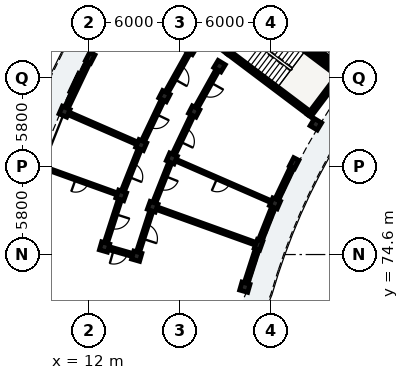
"""IFC4 building model, lengths in metres.
Left out: names, types, materials, properties, quantities, classifications, styles, units other than length and angle.
Written with IfcOpenShell. Run it as: python <this file> out.ifc"""

import sys

from ifc_helpers import new_model, si_unit, direction, frame, frame_2d, origin, origin_2d, place, context, subcontext, project, spatial, rectangle, extrude, element, fill, save


model = new_model("IFC4")
c1 = context("Model", 3, precision=1e-05, world=origin(), true_north=direction((0.0, 1.0)))
c2 = subcontext(c1, "Body", "Model", "MODEL_VIEW")
j1 = project(units=[si_unit("LENGTHUNIT", "METRE"), si_unit("PLANEANGLEUNIT", "RADIAN")], contexts=[c1])
p1 = place(None, origin())
s1 = spatial("IfcSite", under=j1, at=p1, CompositionType="ELEMENT")
p2 = place(p1, origin())
s2 = spatial("IfcBuilding", under=s1, at=p2, CompositionType="ELEMENT")
p3 = place(p2, frame((0.0, 0.0, 12.2)))
s3 = spatial("IfcBuildingStorey", under=s2, at=p3, CompositionType="ELEMENT", Elevation=12.2)
p4 = place(p3, frame((21.199, 87.897, 0.0), z_axis=(0.0, 0.0, 1.0), x_axis=(0.798639633744, -0.601809550782, 0.0)))
e1 = element("IfcWall", 1, at=p4, inside=s3, PredefinedType="SHEAR", context=c2, shape_type="SweptSolid", body=[
    extrude(rectangle(XDim=6.6, YDim=0.28, at=frame_2d((3.3, 0.0))), origin(), (0.0, 0.0, 1.0), 3.11),
])
for number, where, z_axis, x_axis in (
    (2, (26.497, 83.729, 0.0), (0.0, 0.0, 1.0), (0.602, 0.799, 0.0)),
    (3, (21.003, 87.87, 0.0), (0.0, 0.0, 1.0), (0.602, 0.799, 0.0)),
):
    element("IfcWall", number, at=place(p3, frame(where, z_axis=z_axis, x_axis=x_axis)), inside=s3, PredefinedType="SHEAR", context=c2, shape_type="SweptSolid", body=[
        extrude(rectangle(XDim=3.48, YDim=0.28, at=frame_2d((1.74, 0.0))), origin(), (0.0, 0.0, 1.0), 3.11),
    ])
p5 = place(p3, frame((23.125, 90.453, 0.0), z_axis=(0.0, 0.0, 1.0), x_axis=(0.798639633744, -0.601809550782, 0.0)))
e4 = element("IfcWall", 4, at=p5, inside=s3, PredefinedType="SHEAR", context=c2, shape_type="SweptSolid", body=[
    extrude(rectangle(XDim=6.6, YDim=0.28, at=frame_2d((3.3, 0.0))), origin(), (0.0, 0.0, 1.0), 3.11),
])
p6 = place(p5, frame((0.22, 0.0, 0.0)))
e5 = element("IfcOpeningElement", 5, at=p6, cuts=e4, PredefinedType="OPENING", context=c2, shape_type="SweptSolid", body=[
    extrude(rectangle(XDim=1.05, YDim=2.15, at=frame_2d((0.525, 1.075))), frame((0.0, 0.15, 0.0), z_axis=(0.0, -1.0, 0.0), x_axis=(1.0, 0.0, 0.0)), (0.0, 0.0, 1.0), 0.3),
])
p7 = place(p3, frame((26.455, 88.476, 0.0), z_axis=(0.0, 0.0, 1.0), x_axis=(0.798608971494, -0.601850239387, 0.0)))
e6 = element("IfcWall", 6, at=p7, inside=s3, PredefinedType="SHEAR", context=c2, shape_type="SweptSolid", body=[
    extrude(rectangle(XDim=2.7, YDim=0.23, at=frame_2d((1.35, 0.0))), origin(), (0.0, 0.0, 1.0), 3.11),
])
for number, where, z_axis, x_axis in (
    (7, (26.943, 83.167, 0.0), (0.0, 0.0, 1.0), (-0.856, 0.517, 0.0)),
    (8, (20.608, 86.991, 0.0), (0.0, 0.0, 1.0), (-0.856, 0.517, 0.0)),
    (9, (18.724, 88.128, 0.0), (0.0, 0.0, 1.0), (-0.856, 0.517, 0.0)),
):
    element("IfcColumn", number, at=place(p3, frame(where, z_axis=z_axis, x_axis=x_axis)), inside=s3, PredefinedType="COLUMN", context=c2, shape_type="SweptSolid", body=[
        extrude(rectangle(XDim=0.55, YDim=0.55, at=origin_2d()), origin(), (0.0, 0.0, 1.0), 3.105),
    ])
p8 = place(p3, frame((25.513, 80.61, 0.0), z_axis=(0.0, 0.0, 1.0), x_axis=(-0.888350277506, 0.459166401705, 0.0)))
e10 = element("IfcColumn", 10, at=p8, inside=s3, PredefinedType="PILASTER", context=c2, shape_type="SweptSolid", body=[
    extrude(rectangle(XDim=0.38, YDim=0.62, at=origin_2d()), origin(), (0.0, 0.0, 1.0), 3.105),
])
for number, where, z_axis, x_axis in (
    (11, (18.939, 84.008, 0.0), (0.0, 0.0, 1.0), (-0.888, 0.459, 0.0)),
    (12, (16.985, 85.018, 0.0), (0.0, 0.0, 1.0), (-0.888, 0.459, 0.0)),
):
    element("IfcColumn", number, at=place(p3, frame(where, z_axis=z_axis, x_axis=x_axis)), inside=s3, PredefinedType="COLUMN", context=c2, shape_type="SweptSolid", body=[
        extrude(rectangle(XDim=0.55, YDim=0.55, at=origin_2d()), origin(), (0.0, 0.0, 1.0), 3.105),
    ])
p9 = place(p3, frame((12.099, 87.543, 0.0), z_axis=(0.0, 0.0, 1.0), x_axis=(-0.888350277506, 0.459166401705, 0.0)))
e13 = element("IfcColumn", 13, at=p9, inside=s3, PredefinedType="PILASTER", context=c2, shape_type="SweptSolid", body=[
    extrude(rectangle(XDim=0.38, YDim=0.62, at=origin_2d()), origin(), (0.0, 0.0, 1.0), 3.105),
])
for number, where, z_axis, x_axis in (
    (14, (24.254, 77.964, 0.0), (0.0, 0.0, 1.0), (-0.917, 0.4, 0.0)),
    (15, (17.47, 80.921, 0.0), (0.0, 0.0, 1.0), (-0.917, 0.4, 0.0)),
    (16, (15.454, 81.801, 0.0), (0.0, 0.0, 1.0), (-0.917, 0.4, 0.0)),
    (17, (10.412, 83.999, 0.0), (0.0, 0.0, 1.0), (-0.917, 0.4, 0.0)),
):
    element("IfcColumn", number, at=place(p3, frame(where, z_axis=z_axis, x_axis=x_axis)), inside=s3, PredefinedType="COLUMN", context=c2, shape_type="SweptSolid", body=[
        extrude(rectangle(XDim=0.55, YDim=0.55, at=origin_2d()), origin(), (0.0, 0.0, 1.0), 3.105),
    ])
p10 = place(p3, frame((23.172, 75.241, 0.0), z_axis=(0.0, 0.0, 1.0), x_axis=(-0.941012100316, 0.338372911236, 0.0)))
e18 = element("IfcColumn", 18, at=p10, inside=s3, PredefinedType="PILASTER", context=c2, shape_type="SweptSolid", body=[
    extrude(rectangle(XDim=0.38, YDim=0.62, at=origin_2d()), origin(), (0.0, 0.0, 1.0), 3.105),
])
for number, where, z_axis, x_axis in (
    (19, (16.208, 77.745, 0.0), (0.0, 0.0, 1.0), (-0.941, 0.338, 0.0)),
    (20, (14.138, 78.489, 0.0), (0.0, 0.0, 1.0), (-0.941, 0.338, 0.0)),
    (21, (22.272, 72.452, 0.0), (0.0, 0.0, 1.0), (-0.961, 0.276, 0.0)),
    (22, (15.159, 74.492, 0.0), (0.0, 0.0, 1.0), (-0.961, 0.276, 0.0)),
    (23, (13.044, 75.098, 0.0), (0.0, 0.0, 1.0), (-0.961, 0.276, 0.0)),
):
    element("IfcColumn", number, at=place(p3, frame(where, z_axis=z_axis, x_axis=x_axis)), inside=s3, PredefinedType="COLUMN", context=c2, shape_type="SweptSolid", body=[
        extrude(rectangle(XDim=0.55, YDim=0.55, at=origin_2d()), origin(), (0.0, 0.0, 1.0), 3.105),
    ])
p11 = place(p3, frame((12.03, 87.399, 0.0), z_axis=(0.0, 0.0, 1.0), x_axis=(-0.429653621352, -0.902993779413, 0.0)))
e24 = element("IfcWall", 24, at=p11, inside=s3, PredefinedType="SOLIDWALL", context=c2, shape_type="SweptSolid", body=[
    extrude(rectangle(XDim=3.521, YDim=0.245, at=frame_2d((1.76, 0.0))), origin(), (0.0, 0.0, 1.0), 2.355),
])
p12 = place(p11, frame((0.885, 0.0, 0.35)))
e25 = element("IfcOpeningElement", 25, at=p12, cuts=e24, PredefinedType="OPENING", context=c2, shape_type="SweptSolid", body=[
    extrude(rectangle(XDim=1.75, YDim=1.85, at=frame_2d((0.875, 0.925))), frame((0.0, 0.133, 0.0), z_axis=(0.0, -1.0, 0.0), x_axis=(1.0, 0.0, 0.0)), (0.0, 0.0, 1.0), 0.265),
])
p13 = place(p3, frame((25.444, 80.466, 0.0), z_axis=(0.0, 0.0, 1.0), x_axis=(-0.429610836066, -0.903014135844, 0.0)))
e26 = element("IfcWall", 26, at=p13, inside=s3, PredefinedType="SOLIDWALL", context=c2, shape_type="SweptSolid", body=[
    extrude(rectangle(XDim=2.525, YDim=0.245, at=frame_2d((1.263, 0.0))), origin(), (0.0, 0.0, 1.0), 2.355),
])
p14 = place(p13, frame((0.473, 0.0, 0.35)))
e27 = element("IfcOpeningElement", 27, at=p14, cuts=e26, PredefinedType="OPENING", context=c2, shape_type="SweptSolid", body=[
    extrude(rectangle(XDim=1.58, YDim=1.68, at=frame_2d((0.79, 0.84))), frame((0.0, 0.133, 0.0), z_axis=(0.0, -1.0, 0.0), x_axis=(1.0, 0.0, 0.0)), (0.0, 0.0, 1.0), 0.265),
])
p15 = place(p3, frame((24.163, 77.736, 0.0), z_axis=(0.0, 0.0, 1.0), x_axis=(-0.369122600107, -0.92938071106, 0.0)))
e28 = element("IfcWall", 28, at=p15, inside=s3, PredefinedType="SOLIDWALL", context=c2, shape_type="SweptSolid", body=[
    extrude(rectangle(XDim=2.525, YDim=0.245, at=frame_2d((1.263, 0.0))), origin(), (0.0, 0.0, 1.0), 2.355),
])
p16 = place(p15, frame((0.643, 0.0, 0.55)))
e29 = element("IfcOpeningElement", 29, at=p16, cuts=e28, PredefinedType="OPENING", context=c2, shape_type="SweptSolid", body=[
    extrude(rectangle(XDim=1.24, YDim=1.535, at=frame_2d((0.62, 0.768))), frame((0.0, 0.133, 0.0), z_axis=(0.0, -1.0, 0.0), x_axis=(1.0, 0.0, 0.0)), (0.0, 0.0, 1.0), 0.265),
])
p17 = place(p3, frame((23.123, 75.088, 0.0), z_axis=(0.0, 0.0, 1.0), x_axis=(-0.30716379336, -0.951656662903, 0.0)))
e30 = element("IfcWall", 30, at=p17, inside=s3, PredefinedType="SOLIDWALL", context=c2, shape_type="SweptSolid", body=[
    extrude(rectangle(XDim=2.525, YDim=0.245, at=frame_2d((1.263, 0.0))), origin(), (0.0, 0.0, 1.0), 2.355),
])
p18 = place(p17, frame((0.583, 0.0, 0.55)))
e31 = element("IfcOpeningElement", 31, at=p18, cuts=e30, PredefinedType="OPENING", context=c2, shape_type="SweptSolid", body=[
    extrude(rectangle(XDim=1.36, YDim=1.61, at=frame_2d((0.68, 0.805))), frame((0.0, 0.133, 0.0), z_axis=(0.0, -1.0, 0.0), x_axis=(1.0, 0.0, 0.0)), (0.0, 0.0, 1.0), 0.265),
])
p19 = place(p3, frame((9.583, 69.289, 0.0), z_axis=(0.0, 0.0, 1.0), x_axis=(-0.484841794757, 0.874601871743, 0.0)))
e32 = element("IfcWall", 32, at=p19, inside=s3, PredefinedType="SOLIDWALL", context=c2, shape_type="SweptSolid", body=[
    extrude(rectangle(XDim=3.908, YDim=0.245, at=frame_2d((1.954, 0.0))), origin(), (0.0, 0.0, 1.0), 2.355),
])
p20 = place(p19, frame((0.979, 0.0, 0.4)))
e33 = element("IfcOpeningElement", 33, at=p20, cuts=e32, PredefinedType="OPENING", context=c2, shape_type="SweptSolid", body=[
    extrude(rectangle(XDim=1.95, YDim=1.78, at=frame_2d((0.975, 0.89))), frame((0.0, 0.133, 0.0), z_axis=(0.0, -1.0, 0.0), x_axis=(1.0, 0.0, 0.0)), (0.0, 0.0, 1.0), 0.265),
])
p21 = place(p3, frame((18.553, 87.822, 0.0), z_axis=(0.0, 0.0, 1.0), x_axis=(-0.488211211273, -0.872725508501, 0.0)))
e34 = element("IfcWall", 34, at=p21, inside=s3, PredefinedType="PARTITIONING", context=c2, shape_type="SweptSolid", body=[
    extrude(rectangle(XDim=2.863, YDim=0.205, at=frame_2d((1.431, 0.0))), origin(), (0.0, 0.0, 1.0), 2.37),
])
p22 = place(p21, frame((0.947, 0.0, 0.0)))
e35 = element("IfcOpeningElement", 35, at=p22, cuts=e34, PredefinedType="OPENING", context=c2, shape_type="SweptSolid", body=[
    extrude(rectangle(XDim=0.97, YDim=2.15, at=frame_2d((0.485, 1.075))), frame((0.0, 0.113, 0.0), z_axis=(0.0, -1.0, 0.0), x_axis=(1.0, 0.0, 0.0)), (0.0, 0.0, 1.0), 0.225),
])
p23 = place(p3, frame((20.437, 86.685, 0.0), z_axis=(0.0, 0.0, 1.0), x_axis=(-0.48819576874, -0.872734147025, 0.0)))
e36 = element("IfcWall", 36, at=p23, inside=s3, PredefinedType="PARTITIONING", context=c2, shape_type="SweptSolid", body=[
    extrude(rectangle(XDim=2.718, YDim=0.205, at=frame_2d((1.359, 0.0))), origin(), (0.0, 0.0, 1.0), 2.37),
])
p24 = place(p23, frame((0.874, 0.0, 0.0)))
e37 = element("IfcOpeningElement", 37, at=p24, cuts=e36, PredefinedType="OPENING", context=c2, shape_type="SweptSolid", body=[
    extrude(rectangle(XDim=0.97, YDim=2.15, at=frame_2d((0.485, 1.075))), frame((0.0, 0.113, 0.0), z_axis=(0.0, -1.0, 0.0), x_axis=(1.0, 0.0, 0.0)), (0.0, 0.0, 1.0), 0.225),
])
p25 = place(p3, frame((16.834, 84.702, 0.0), z_axis=(0.0, 0.0, 1.0), x_axis=(-0.429595933416, -0.90302122566, 0.0)))
e38 = element("IfcWall", 38, at=p25, inside=s3, PredefinedType="PARTITIONING", context=c2, shape_type="SweptSolid", body=[
    extrude(rectangle(XDim=2.863, YDim=0.205, at=frame_2d((1.432, 0.0))), origin(), (0.0, 0.0, 1.0), 2.37),
])
p26 = place(p25, frame((0.957, 0.0, 0.0)))
e39 = element("IfcOpeningElement", 39, at=p26, cuts=e38, PredefinedType="OPENING", context=c2, shape_type="SweptSolid", body=[
    extrude(rectangle(XDim=0.95, YDim=2.13, at=frame_2d((0.475, 1.065))), frame((0.0, 0.113, 0.0), z_axis=(0.0, -1.0, 0.0), x_axis=(1.0, 0.0, 0.0)), (0.0, 0.0, 1.0), 0.225),
])
p27 = place(p3, frame((18.789, 83.692, 0.0), z_axis=(0.0, 0.0, 1.0), x_axis=(-0.429630211913, -0.90300491749, 0.0)))
e40 = element("IfcWall", 40, at=p27, inside=s3, PredefinedType="PARTITIONING", context=c2, shape_type="SweptSolid", body=[
    extrude(rectangle(XDim=2.718, YDim=0.205, at=frame_2d((1.359, 0.0))), origin(), (0.0, 0.0, 1.0), 2.37),
])
p28 = place(p27, frame((0.884, 0.0, 0.0)))
e41 = element("IfcOpeningElement", 41, at=p28, cuts=e40, PredefinedType="OPENING", context=c2, shape_type="SweptSolid", body=[
    extrude(rectangle(XDim=0.95, YDim=2.13, at=frame_2d((0.475, 1.065))), frame((0.0, 0.113, 0.0), z_axis=(0.0, -1.0, 0.0), x_axis=(1.0, 0.0, 0.0)), (0.0, 0.0, 1.0), 0.225),
])
p29 = place(p3, frame((15.087, 81.96, 0.0), z_axis=(0.0, 0.0, 1.0), x_axis=(-0.916663273961, 0.39966040856, 0.0)))
e42 = element("IfcWall", 42, at=p29, inside=s3, PredefinedType="PARTITIONING", context=c2, shape_type="SweptSolid", body=[
    extrude(rectangle(XDim=4.7, YDim=0.185, at=frame_2d((2.35, 0.0))), origin(), (0.0, 0.0, 1.0), 2.37),
])
p30 = place(p3, frame((23.887, 78.124, 0.0), z_axis=(0.0, 0.0, 1.0), x_axis=(-0.916668515796, 0.399648385645, 0.0)))
e43 = element("IfcWall", 43, at=p30, inside=s3, PredefinedType="PARTITIONING", context=c2, shape_type="SweptSolid", body=[
    extrude(rectangle(XDim=6.6, YDim=0.125, at=frame_2d((3.3, 0.0))), origin(), (0.0, 0.0, 1.0), 2.37),
])
p31 = place(p30, frame((2.855, 0.0, 0.0)))
e44 = element("IfcOpeningElement", 44, at=p31, cuts=e43, PredefinedType="OPENING", context=c2, shape_type="SweptSolid", body=[
    extrude(rectangle(XDim=0.89, YDim=2.1, at=frame_2d((0.445, 1.05))), frame((0.0, 0.073, 0.0), z_axis=(0.0, -1.0, 0.0), x_axis=(1.0, 0.0, 0.0)), (0.0, 0.0, 1.0), 0.145),
])
p32 = place(p3, frame((15.325, 81.475, 0.0), z_axis=(0.0, 0.0, 1.0), x_axis=(-0.369213832442, -0.929344471083, 0.0)))
e45 = element("IfcWall", 45, at=p32, inside=s3, PredefinedType="PARTITIONING", context=c2, shape_type="SweptSolid", body=[
    extrude(rectangle(XDim=2.863, YDim=0.205, at=frame_2d((1.432, 0.0))), origin(), (0.0, 0.0, 1.0), 2.37),
])
p33 = place(p32, frame((0.967, 0.0, 0.0)))
e46 = element("IfcOpeningElement", 46, at=p33, cuts=e45, PredefinedType="OPENING", context=c2, shape_type="SweptSolid", body=[
    extrude(rectangle(XDim=0.93, YDim=2.12, at=frame_2d((0.465, 1.06))), frame((0.0, 0.113, 0.0), z_axis=(0.0, -1.0, 0.0), x_axis=(1.0, 0.0, 0.0)), (0.0, 0.0, 1.0), 0.225),
])
p34 = place(p3, frame((17.341, 80.596, 0.0), z_axis=(0.0, 0.0, 1.0), x_axis=(-0.369237170461, -0.929335198919, 0.0)))
e47 = element("IfcWall", 47, at=p34, inside=s3, PredefinedType="PARTITIONING", context=c2, shape_type="SweptSolid", body=[
    extrude(rectangle(XDim=2.718, YDim=0.205, at=frame_2d((1.359, 0.0))), origin(), (0.0, 0.0, 1.0), 2.37),
])
p35 = place(p34, frame((0.894, 0.0, 0.0)))
e48 = element("IfcOpeningElement", 48, at=p35, cuts=e47, PredefinedType="OPENING", context=c2, shape_type="SweptSolid", body=[
    extrude(rectangle(XDim=0.93, YDim=2.12, at=frame_2d((0.465, 1.06))), frame((0.0, 0.113, 0.0), z_axis=(0.0, -1.0, 0.0), x_axis=(1.0, 0.0, 0.0)), (0.0, 0.0, 1.0), 0.225),
])
p36 = place(p3, frame((13.762, 78.625, 0.0), z_axis=(0.0, 0.0, 1.0), x_axis=(-0.941015806044, 0.338362605463, 0.0)))
e49 = element("IfcWall", 49, at=p36, inside=s3, PredefinedType="PLUMBINGWALL", context=c2, shape_type="SweptSolid", body=[
    extrude(rectangle(XDim=4.7, YDim=0.14, at=frame_2d((2.35, 0.0))), origin(), (0.0, 0.0, 1.0), 2.37),
])
p37 = place(p36, frame((1.92, 0.0, 0.0)))
e50 = element("IfcOpeningElement", 50, at=p37, cuts=e49, PredefinedType="OPENING", context=c2, shape_type="SweptSolid", body=[
    extrude(rectangle(XDim=0.86, YDim=2.06, at=frame_2d((0.43, 1.03))), frame((0.0, 0.08, 0.0), z_axis=(0.0, -1.0, 0.0), x_axis=(1.0, 0.0, 0.0)), (0.0, 0.0, 1.0), 0.16),
])
p38 = place(p3, frame((22.796, 75.376, 0.0), z_axis=(0.0, 0.0, 1.0), x_axis=(-0.941005714099, 0.338390670725, 0.0)))
e51 = element("IfcWall", 51, at=p38, inside=s3, PredefinedType="PARTITIONING", context=c2, shape_type="SweptSolid", body=[
    extrude(rectangle(XDim=6.6, YDim=0.185, at=frame_2d((3.3, 0.0))), origin(), (0.0, 0.0, 1.0), 2.37),
])
p39 = place(p3, frame((14.031, 78.156, 0.0), z_axis=(0.0, 0.0, 1.0), x_axis=(-0.307132325305, -0.951666819193, 0.0)))
e52 = element("IfcWall", 52, at=p39, inside=s3, PredefinedType="PARTITIONING", context=c2, shape_type="SweptSolid", body=[
    extrude(rectangle(XDim=2.863, YDim=0.205, at=frame_2d((1.432, 0.0))), origin(), (0.0, 0.0, 1.0), 2.37),
])
p40 = place(p39, frame((0.937, 0.0, 0.0)))
e53 = element("IfcOpeningElement", 53, at=p40, cuts=e52, PredefinedType="OPENING", context=c2, shape_type="SweptSolid", body=[
    extrude(rectangle(XDim=0.99, YDim=2.16, at=frame_2d((0.495, 1.08))), frame((0.0, 0.113, 0.0), z_axis=(0.0, -1.0, 0.0), x_axis=(1.0, 0.0, 0.0)), (0.0, 0.0, 1.0), 0.225),
])
p41 = place(p3, frame((16.101, 77.412, 0.0), z_axis=(0.0, 0.0, 1.0), x_axis=(-0.307186478934, -0.95164934044, 0.0)))
e54 = element("IfcWall", 54, at=p41, inside=s3, PredefinedType="PARTITIONING", context=c2, shape_type="SweptSolid", body=[
    extrude(rectangle(XDim=2.718, YDim=0.205, at=frame_2d((1.359, 0.0))), origin(), (0.0, 0.0, 1.0), 2.37),
])
p42 = place(p41, frame((0.864, 0.0, 0.0)))
e55 = element("IfcOpeningElement", 55, at=p42, cuts=e54, PredefinedType="OPENING", context=c2, shape_type="SweptSolid", body=[
    extrude(rectangle(XDim=0.99, YDim=2.16, at=frame_2d((0.495, 1.08))), frame((0.0, 0.113, 0.0), z_axis=(0.0, -1.0, 0.0), x_axis=(1.0, 0.0, 0.0)), (0.0, 0.0, 1.0), 0.225),
])
p43 = place(p3, frame((15.111, 74.506, 0.0), z_axis=(0.0, 0.0, 1.0), x_axis=(-0.961264701934, 0.275626872449, 0.0)))
e56 = element("IfcWall", 56, at=p43, inside=s3, PredefinedType="PARTITIONING", context=c2, shape_type="SweptSolid", body=[
    extrude(rectangle(XDim=2.1, YDim=0.205, at=frame_2d((1.05, 0.0))), origin(), (0.0, 0.0, 1.0), 2.37),
])
p44 = place(p43, frame((0.57, 0.0, 0.0)))
e57 = element("IfcOpeningElement", 57, at=p44, cuts=e56, PredefinedType="OPENING", context=c2, shape_type="SweptSolid", body=[
    extrude(rectangle(XDim=0.95, YDim=2.13, at=frame_2d((0.475, 1.065))), frame((0.0, 0.113, 0.0), z_axis=(0.0, -1.0, 0.0), x_axis=(1.0, 0.0, 0.0)), (0.0, 0.0, 1.0), 0.225),
])
p45 = place(p12, origin())
e58 = element("IfcWindow", 58, at=p45, inside=s3, PartitioningType="SINGLE_PANEL", PredefinedType="WINDOW", context=c2, shape_type="SweptSolid", body=[
    extrude(rectangle(XDim=1.75, YDim=1.85, at=frame_2d((0.875, 0.925))), frame((0.0, 0.03, 0.0), z_axis=(0.0, -1.0, 0.0), x_axis=(1.0, 0.0, 0.0)), (0.0, 0.0, 1.0), 0.06),
])
fill(e25, e58)
p46 = place(p14, origin())
e59 = element("IfcWindow", 59, at=p46, inside=s3, PartitioningType="SINGLE_PANEL", PredefinedType="WINDOW", context=c2, shape_type="SweptSolid", body=[
    extrude(rectangle(XDim=1.58, YDim=1.68, at=frame_2d((0.79, 0.84))), frame((0.0, 0.03, 0.0), z_axis=(0.0, -1.0, 0.0), x_axis=(1.0, 0.0, 0.0)), (0.0, 0.0, 1.0), 0.06),
])
fill(e27, e59)
p47 = place(p16, origin())
e60 = element("IfcWindow", 60, at=p47, inside=s3, PartitioningType="SINGLE_PANEL", PredefinedType="WINDOW", context=c2, shape_type="SweptSolid", body=[
    extrude(rectangle(XDim=1.24, YDim=1.535, at=frame_2d((0.62, 0.768))), frame((0.0, 0.03, 0.0), z_axis=(0.0, -1.0, 0.0), x_axis=(1.0, 0.0, 0.0)), (0.0, 0.0, 1.0), 0.06),
])
fill(e29, e60)
p48 = place(p18, origin())
e61 = element("IfcWindow", 61, at=p48, inside=s3, PartitioningType="SINGLE_PANEL", PredefinedType="WINDOW", context=c2, shape_type="SweptSolid", body=[
    extrude(rectangle(XDim=1.36, YDim=1.61, at=frame_2d((0.68, 0.805))), frame((0.0, 0.03, 0.0), z_axis=(0.0, -1.0, 0.0), x_axis=(1.0, 0.0, 0.0)), (0.0, 0.0, 1.0), 0.06),
])
fill(e31, e61)
p49 = place(p22, origin())
e62 = element("IfcDoor", 62, at=p49, inside=s3, OperationType="SINGLE_SWING_RIGHT", PredefinedType="DOOR", context=c2, shape_type="SweptSolid", body=[
    extrude(rectangle(XDim=0.97, YDim=2.15, at=frame_2d((0.485, 1.075))), frame((0.0, 0.025, 0.0), z_axis=(0.0, -1.0, 0.0), x_axis=(1.0, 0.0, 0.0)), (0.0, 0.0, 1.0), 0.05),
])
fill(e35, e62)
p50 = place(p24, origin())
e63 = element("IfcDoor", 63, at=p50, inside=s3, OperationType="SINGLE_SWING_LEFT", PredefinedType="DOOR", context=c2, shape_type="SweptSolid", body=[
    extrude(rectangle(XDim=0.97, YDim=2.15, at=frame_2d((0.485, 1.075))), frame((0.0, 0.025, 0.0), z_axis=(0.0, -1.0, 0.0), x_axis=(1.0, 0.0, 0.0)), (0.0, 0.0, 1.0), 0.05),
])
fill(e37, e63)
p51 = place(p26, origin())
e64 = element("IfcDoor", 64, at=p51, inside=s3, OperationType="SINGLE_SWING_LEFT", PredefinedType="DOOR", context=c2, shape_type="SweptSolid", body=[
    extrude(rectangle(XDim=0.95, YDim=2.13, at=frame_2d((0.475, 1.065))), frame((0.0, 0.025, 0.0), z_axis=(0.0, -1.0, 0.0), x_axis=(1.0, 0.0, 0.0)), (0.0, 0.0, 1.0), 0.05),
])
fill(e39, e64)
p52 = place(p28, origin())
e65 = element("IfcDoor", 65, at=p52, inside=s3, OperationType="SINGLE_SWING_RIGHT", PredefinedType="DOOR", context=c2, shape_type="SweptSolid", body=[
    extrude(rectangle(XDim=0.95, YDim=2.13, at=frame_2d((0.475, 1.065))), frame((0.0, 0.025, 0.0), z_axis=(0.0, -1.0, 0.0), x_axis=(1.0, 0.0, 0.0)), (0.0, 0.0, 1.0), 0.05),
])
fill(e41, e65)
p53 = place(p31, origin())
e66 = element("IfcDoor", 66, at=p53, inside=s3, OperationType="SINGLE_SWING_RIGHT", PredefinedType="DOOR", context=c2, shape_type="SweptSolid", body=[
    extrude(rectangle(XDim=0.89, YDim=2.1, at=frame_2d((0.445, 1.05))), frame((0.0, 0.025, 0.0), z_axis=(0.0, -1.0, 0.0), x_axis=(1.0, 0.0, 0.0)), (0.0, 0.0, 1.0), 0.05),
])
fill(e44, e66)
p54 = place(p33, origin())
e67 = element("IfcDoor", 67, at=p54, inside=s3, OperationType="SINGLE_SWING_RIGHT", PredefinedType="DOOR", context=c2, shape_type="SweptSolid", body=[
    extrude(rectangle(XDim=0.93, YDim=2.12, at=frame_2d((0.465, 1.06))), frame((0.0, 0.025, 0.0), z_axis=(0.0, -1.0, 0.0), x_axis=(1.0, 0.0, 0.0)), (0.0, 0.0, 1.0), 0.05),
])
fill(e46, e67)
p55 = place(p35, origin())
e68 = element("IfcDoor", 68, at=p55, inside=s3, OperationType="SINGLE_SWING_LEFT", PredefinedType="DOOR", context=c2, shape_type="SweptSolid", body=[
    extrude(rectangle(XDim=0.93, YDim=2.12, at=frame_2d((0.465, 1.06))), frame((0.0, 0.025, 0.0), z_axis=(0.0, -1.0, 0.0), x_axis=(1.0, 0.0, 0.0)), (0.0, 0.0, 1.0), 0.05),
])
fill(e48, e68)
p56 = place(p37, origin())
e69 = element("IfcDoor", 69, at=p56, inside=s3, OperationType="SINGLE_SWING_RIGHT", PredefinedType="DOOR", context=c2, shape_type="SweptSolid", body=[
    extrude(rectangle(XDim=0.86, YDim=2.06, at=frame_2d((0.43, 1.03))), frame((0.0, 0.025, 0.0), z_axis=(0.0, -1.0, 0.0), x_axis=(1.0, 0.0, 0.0)), (0.0, 0.0, 1.0), 0.05),
])
fill(e50, e69)
p57 = place(p40, origin())
e70 = element("IfcDoor", 70, at=p57, inside=s3, OperationType="SINGLE_SWING_LEFT", PredefinedType="DOOR", context=c2, shape_type="SweptSolid", body=[
    extrude(rectangle(XDim=0.99, YDim=2.16, at=frame_2d((0.495, 1.08))), frame((0.0, 0.025, 0.0), z_axis=(0.0, -1.0, 0.0), x_axis=(1.0, 0.0, 0.0)), (0.0, 0.0, 1.0), 0.05),
])
fill(e53, e70)
p58 = place(p42, origin())
e71 = element("IfcDoor", 71, at=p58, inside=s3, OperationType="SINGLE_SWING_RIGHT", PredefinedType="DOOR", context=c2, shape_type="SweptSolid", body=[
    extrude(rectangle(XDim=0.99, YDim=2.16, at=frame_2d((0.495, 1.08))), frame((0.0, 0.025, 0.0), z_axis=(0.0, -1.0, 0.0), x_axis=(1.0, 0.0, 0.0)), (0.0, 0.0, 1.0), 0.05),
])
fill(e55, e71)
p59 = place(p44, origin())
e72 = element("IfcDoor", 72, at=p59, inside=s3, OperationType="SINGLE_SWING_RIGHT", PredefinedType="DOOR", context=c2, shape_type="SweptSolid", body=[
    extrude(rectangle(XDim=0.95, YDim=2.13, at=frame_2d((0.475, 1.065))), frame((0.0, 0.025, 0.0), z_axis=(0.0, -1.0, 0.0), x_axis=(1.0, 0.0, 0.0)), (0.0, 0.0, 1.0), 0.05),
])
fill(e57, e72)
save(model, sys.argv[1])
